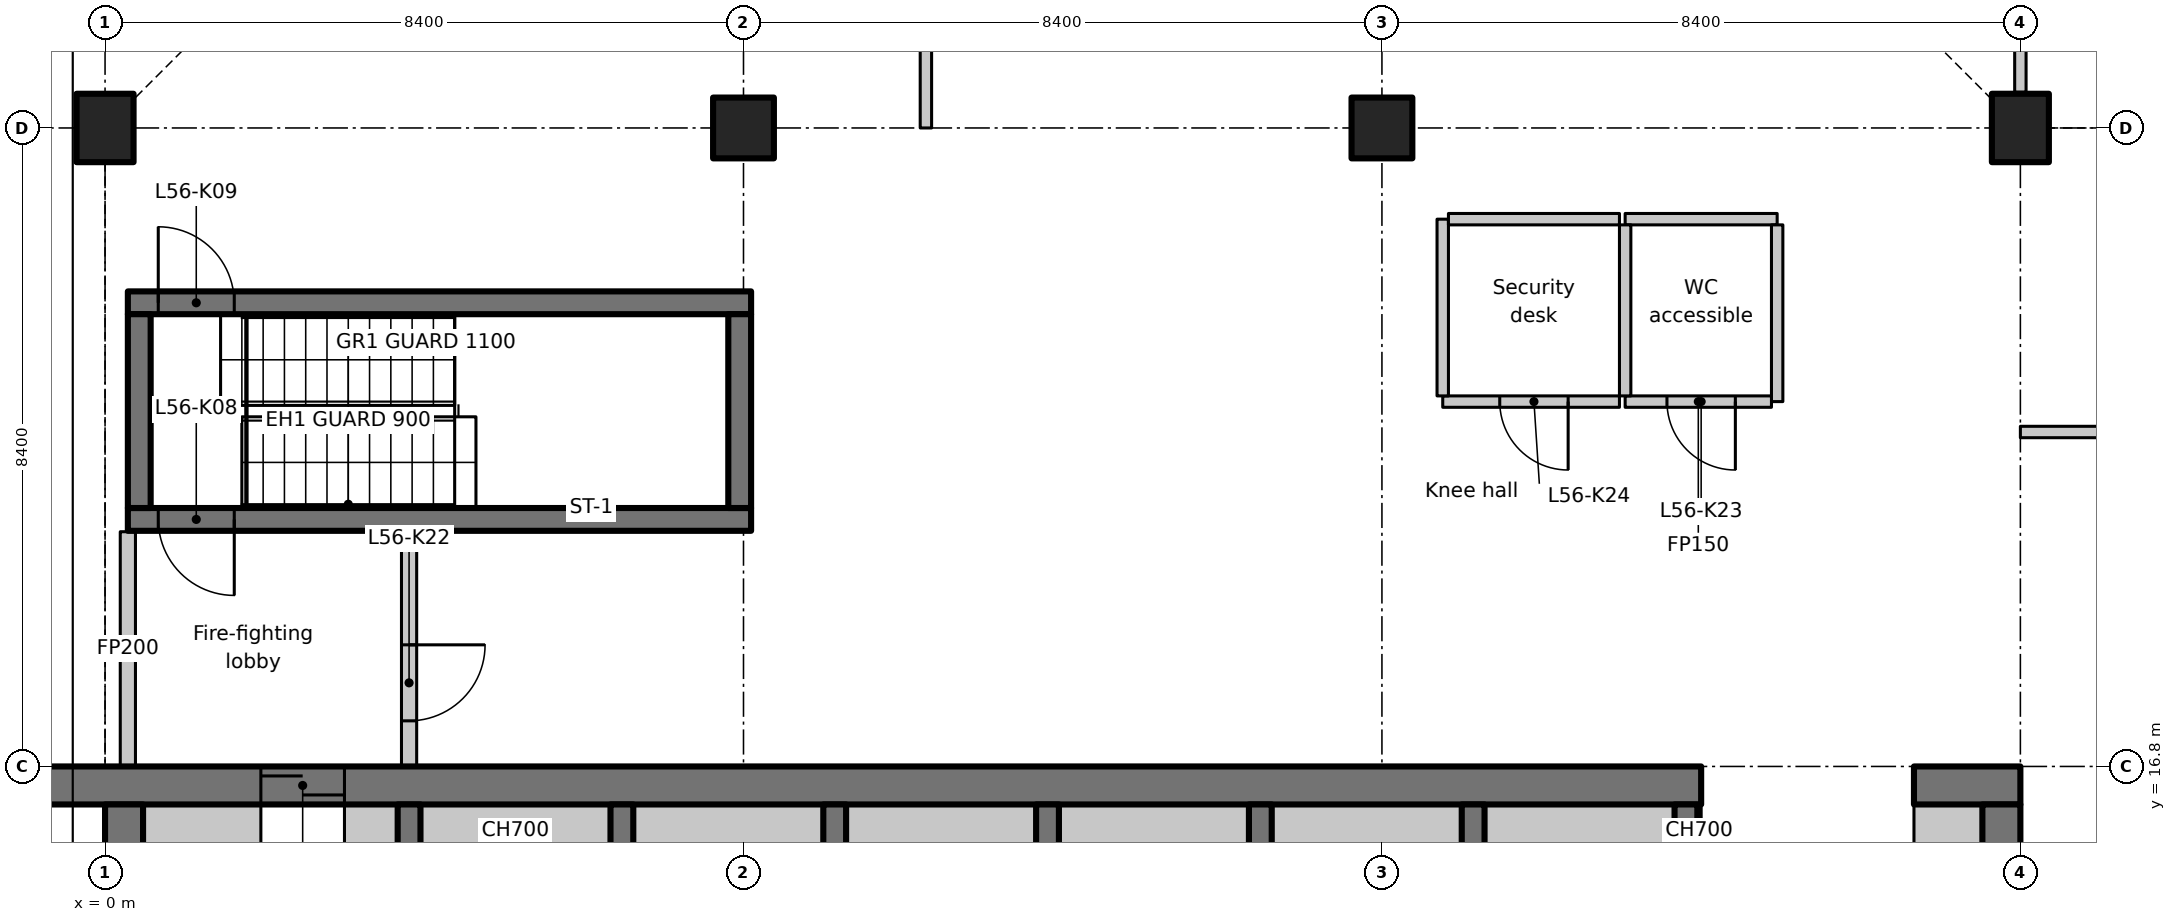
"""IFC4 building model, lengths in metres.
Left out: names, types, materials, properties, quantities, classifications, styles, units other than length and angle.
Written with IfcOpenShell. Run it as: python <this file> out.ifc"""

import sys

from ifc_helpers import new_model, si_unit, direction, frame, frame_2d, origin, origin_2d, place, context, subcontext, project, spatial, polyline, rectangle, outline, extrude, element, fill, save


model = new_model("IFC4")
c1 = context("Model", 3, precision=1e-05, world=origin(), true_north=direction((0.0, 1.0)))
c2 = subcontext(c1, "Body", "Model", "MODEL_VIEW")
j1 = project(units=[si_unit("LENGTHUNIT", "METRE"), si_unit("PLANEANGLEUNIT", "RADIAN")], contexts=[c1])
p1 = place(None, origin())
s1 = spatial("IfcSite", under=j1, at=p1, CompositionType="ELEMENT")
p2 = place(p1, origin())
s2 = spatial("IfcBuilding", under=s1, at=p2, CompositionType="ELEMENT")
p3 = place(p2, frame((0.0, 0.0, 222.9)))
s3 = spatial("IfcBuildingStorey", under=s2, at=p3, CompositionType="ELEMENT", Elevation=222.9)
p4 = place(p3, frame((0.0, 25.2, 0.0), z_axis=(0.0, 0.0, 1.0), x_axis=(1.0, 0.0, 0.0)))
e1 = element("IfcColumn", 1, at=p4, inside=s3, PredefinedType="COLUMN", context=c2, shape_type="SweptSolid", body=[
    extrude(rectangle(XDim=0.75, YDim=0.9, at=origin_2d()), origin(), (0.0, 0.0, 1.0), 3.35),
])
for number, where, z_axis, x_axis in (
    (2, (8.4, 25.2, 0.0), (0.0, 0.0, 1.0), (1.0, 0.0, 0.0)),
    (3, (16.8, 25.2, 0.0), (0.0, 0.0, 1.0), (1.0, 0.0, 0.0)),
):
    element("IfcColumn", number, at=place(p3, frame(where, z_axis=z_axis, x_axis=x_axis)), inside=s3, PredefinedType="COLUMN", context=c2, shape_type="SweptSolid", body=[
        extrude(rectangle(XDim=0.8, YDim=0.8, at=origin_2d()), origin(), (0.0, 0.0, 1.0), 3.35),
    ])
p5 = place(p3, frame((25.2, 25.2, 0.0), z_axis=(0.0, 0.0, 1.0), x_axis=(1.0, 0.0, 0.0)))
e4 = element("IfcColumn", 4, at=p5, inside=s3, PredefinedType="COLUMN", context=c2, shape_type="SweptSolid", body=[
    extrude(rectangle(XDim=0.75, YDim=0.9, at=origin_2d()), origin(), (0.0, 0.0, 1.0), 3.35),
])
p6 = place(p3, frame((-1.1, 16.55, 0.0), z_axis=(0.0, 0.0, 1.0), x_axis=(1.0, 0.0, 0.0)))
e5 = element("IfcWall", 5, at=p6, inside=s3, PredefinedType="SHEAR", context=c2, shape_type="SweptSolid", body=[
    extrude(rectangle(XDim=22.1, YDim=0.5, at=frame_2d((11.05, 0.0))), origin(), (0.0, 0.0, 1.0), 3.35),
])
p7 = place(p6, frame((3.15, 0.0, 0.0)))
e6 = element("IfcOpeningElement", 6, at=p7, cuts=e5, PredefinedType="OPENING", context=c2, shape_type="SweptSolid", body=[
    extrude(rectangle(XDim=1.1, YDim=2.3, at=frame_2d((0.55, 1.15))), frame((0.0, 0.26, 0.0), z_axis=(0.0, -1.0, 0.0), x_axis=(1.0, 0.0, 0.0)), (0.0, 0.0, 1.0), 0.52),
])
p8 = place(p3, frame((23.8, 16.55, 0.0), z_axis=(0.0, 0.0, 1.0), x_axis=(1.0, 0.0, 0.0)))
e7 = element("IfcWall", 7, at=p8, inside=s3, PredefinedType="SHEAR", context=c2, shape_type="SweptSolid", body=[
    extrude(rectangle(XDim=1.4, YDim=0.5, at=frame_2d((0.7, 0.0))), origin(), (0.0, 0.0, 1.0), 3.35),
])
p9 = place(p3, frame((0.25, 7.436, 0.0), z_axis=(0.0, 0.0, 1.0), x_axis=(0.0, 1.0, 0.0)))
e8 = element("IfcWall", 8, at=p9, inside=s3, PredefinedType="SHEAR", context=c2, shape_type="SweptSolid", body=[
    extrude(rectangle(XDim=8.864, YDim=0.5, at=frame_2d((4.432, 0.0))), origin(), (0.0, 0.0, 1.0), 3.35),
])
p10 = place(p3, frame((24.95, 12.6, 0.0), z_axis=(0.0, 0.0, 1.0), x_axis=(0.0, 1.0, 0.0)))
e9 = element("IfcWall", 9, at=p10, inside=s3, PredefinedType="SHEAR", context=c2, shape_type="SweptSolid", body=[
    extrude(rectangle(XDim=3.7, YDim=0.5, at=frame_2d((1.85, 0.0))), origin(), (0.0, 0.0, 1.0), 3.35),
])
p11 = place(p3, frame((0.5, 15.95, 0.0), z_axis=(0.0, 0.0, 1.0), x_axis=(1.0, 0.0, 0.0)))
e10 = element("IfcWall", 10, at=p11, inside=s3, PredefinedType="PARTITIONING", context=c2, shape_type="SweptSolid", body=[
    extrude(rectangle(XDim=1.55, YDim=0.7, at=frame_2d((0.775, 0.0))), origin(), (0.0, 0.0, 1.0), 3.35),
])
p12 = place(p3, frame((23.8, 15.95, 0.0), z_axis=(0.0, 0.0, 1.0), x_axis=(1.0, 0.0, 0.0)))
e11 = element("IfcWall", 11, at=p12, inside=s3, PredefinedType="PARTITIONING", context=c2, shape_type="SweptSolid", body=[
    extrude(rectangle(XDim=0.9, YDim=0.7, at=frame_2d((0.45, 0.0))), origin(), (0.0, 0.0, 1.0), 3.35),
])
for number, where, z_axis, x_axis in (
    (12, (4.0, 12.95, 0.0), (0.0, 0.0, 1.0), (0.0, 1.0, 0.0)),
    (13, (6.8, 12.95, 0.0), (0.0, 0.0, 1.0), (0.0, 1.0, 0.0)),
    (14, (9.6, 12.95, 0.0), (0.0, 0.0, 1.0), (0.0, 1.0, 0.0)),
    (15, (12.4, 12.95, 0.0), (0.0, 0.0, 1.0), (0.0, 1.0, 0.0)),
    (16, (15.2, 12.95, 0.0), (0.0, 0.0, 1.0), (0.0, 1.0, 0.0)),
    (17, (18.0, 12.95, 0.0), (0.0, 0.0, 1.0), (0.0, 1.0, 0.0)),
    (18, (20.8, 12.95, 0.0), (0.0, 0.0, 1.0), (0.0, 1.0, 0.0)),
):
    element("IfcWall", number, at=place(p3, frame(where, z_axis=z_axis, x_axis=x_axis)), inside=s3, PredefinedType="SHEAR", context=c2, shape_type="SweptSolid", body=[
        extrude(rectangle(XDim=3.35, YDim=0.3, at=frame_2d((1.675, 0.0))), origin(), (0.0, 0.0, 1.0), 3.35),
    ])
p13 = place(p3, frame((8.5, 20.05, 0.0), z_axis=(0.0, 0.0, 1.0), x_axis=(-1.0, 0.0, 0.0)))
e19 = element("IfcWall", 19, at=p13, inside=s3, PredefinedType="SHEAR", context=c2, shape_type="SweptSolid", body=[
    extrude(rectangle(XDim=8.2, YDim=0.3, at=frame_2d((4.1, 0.0))), origin(), (0.0, 0.0, 1.0), 3.35),
])
p14 = place(p13, frame((6.8, 0.0, 0.0)))
e20 = element("IfcOpeningElement", 20, at=p14, cuts=e19, PredefinedType="OPENING", context=c2, shape_type="SweptSolid", body=[
    extrude(rectangle(XDim=1.0, YDim=2.1, at=frame_2d((0.5, 1.05))), frame((0.0, 0.16, 0.0), z_axis=(0.0, -1.0, 0.0), x_axis=(1.0, 0.0, 0.0)), (0.0, 0.0, 1.0), 0.32),
])
p15 = place(p3, frame((0.3, 22.9, 0.0), z_axis=(0.0, 0.0, 1.0), x_axis=(1.0, 0.0, 0.0)))
e21 = element("IfcWall", 21, at=p15, inside=s3, PredefinedType="SHEAR", context=c2, shape_type="SweptSolid", body=[
    extrude(rectangle(XDim=8.2, YDim=0.3, at=frame_2d((4.1, 0.0))), origin(), (0.0, 0.0, 1.0), 3.35),
])
p16 = place(p15, frame((0.4, 0.0, 0.0)))
e22 = element("IfcOpeningElement", 22, at=p16, cuts=e21, PredefinedType="OPENING", context=c2, shape_type="SweptSolid", body=[
    extrude(rectangle(XDim=1.0, YDim=2.1, at=frame_2d((0.5, 1.05))), frame((0.0, 0.16, 0.0), z_axis=(0.0, -1.0, 0.0), x_axis=(1.0, 0.0, 0.0)), (0.0, 0.0, 1.0), 0.32),
])
for number, where, z_axis, x_axis in (
    (23, (0.45, 20.2, 0.0), (0.0, 0.0, 1.0), (0.0, 1.0, 0.0)),
    (24, (8.35, 20.2, 0.0), (0.0, 0.0, 1.0), (0.0, 1.0, 0.0)),
):
    element("IfcWall", number, at=place(p3, frame(where, z_axis=z_axis, x_axis=x_axis)), inside=s3, PredefinedType="SHEAR", context=c2, shape_type="SweptSolid", body=[
        extrude(rectangle(XDim=2.55, YDim=0.3, at=frame_2d((1.275, 0.0))), origin(), (0.0, 0.0, 1.0), 3.35),
    ])
p17 = place(p3, frame((0.3, 16.812, 0.0), z_axis=(0.0, 0.0, 1.0), x_axis=(0.0, 1.0, 0.0)))
e25 = element("IfcWall", 25, at=p17, inside=s3, PredefinedType="PARTITIONING", context=c2, shape_type="SweptSolid", body=[
    extrude(rectangle(XDim=3.076, YDim=0.2, at=frame_2d((1.538, 0.0))), origin(), (0.0, 0.0, 1.0), 2.98),
])
p18 = place(p3, frame((4.0, 19.888, 0.0), z_axis=(0.0, 0.0, 1.0), x_axis=(0.0, -1.0, 0.0)))
e26 = element("IfcWall", 26, at=p18, inside=s3, PredefinedType="PARTITIONING", context=c2, shape_type="SweptSolid", body=[
    extrude(rectangle(XDim=3.076, YDim=0.2, at=frame_2d((1.538, 0.0))), origin(), (0.0, 0.0, 1.0), 3.35),
])
p19 = place(p18, frame((1.488, 0.0, 0.0)))
e27 = element("IfcOpeningElement", 27, at=p19, cuts=e26, PredefinedType="OPENING", context=c2, shape_type="SweptSolid", body=[
    extrude(rectangle(XDim=1.0, YDim=2.1, at=frame_2d((0.5, 1.05))), frame((0.0, 0.11, 0.0), z_axis=(0.0, -1.0, 0.0), x_axis=(1.0, 0.0, 0.0)), (0.0, 0.0, 1.0), 0.22),
])
p20 = place(p3, frame((20.0, 24.0, 0.0), z_axis=(0.0, 0.0, 1.0), x_axis=(1.0, 0.0, 0.0)))
e28 = element("IfcWall", 28, at=p20, inside=s3, PredefinedType="PARTITIONING", context=c2, shape_type="SweptSolid", body=[
    extrude(rectangle(XDim=2.0, YDim=0.15, at=frame_2d((1.0, 0.0))), origin(), (0.0, 0.0, 1.0), 3.35),
])
p21 = place(p3, frame((22.0, 23.925, 0.0), z_axis=(0.0, 0.0, 1.0), x_axis=(0.0, -1.0, 0.0)))
e29 = element("IfcWall", 29, at=p21, inside=s3, PredefinedType="PARTITIONING", context=c2, shape_type="SweptSolid", body=[
    extrude(rectangle(XDim=2.325, YDim=0.15, at=frame_2d((1.163, 0.0))), origin(), (0.0, 0.0, 1.0), 3.35),
])
p22 = place(p3, frame((21.925, 21.6, 0.0), z_axis=(0.0, 0.0, 1.0), x_axis=(-1.0, 0.0, 0.0)))
e30 = element("IfcWall", 30, at=p22, inside=s3, PredefinedType="PARTITIONING", context=c2, shape_type="SweptSolid", body=[
    extrude(rectangle(XDim=1.925, YDim=0.15, at=frame_2d((0.962, 0.0))), origin(), (0.0, 0.0, 1.0), 3.35),
])
p23 = place(p22, frame((0.475, 0.0, 0.0)))
e31 = element("IfcOpeningElement", 31, at=p23, cuts=e30, PredefinedType="OPENING", context=c2, shape_type="SweptSolid", body=[
    extrude(rectangle(XDim=0.9, YDim=2.1, at=frame_2d((0.45, 1.05))), frame((0.0, 0.085, 0.0), z_axis=(0.0, -1.0, 0.0), x_axis=(1.0, 0.0, 0.0)), (0.0, 0.0, 1.0), 0.17),
])
p24 = place(p3, frame((20.0, 21.675, 0.0), z_axis=(0.0, 0.0, 1.0), x_axis=(0.0, 1.0, 0.0)))
e32 = element("IfcWall", 32, at=p24, inside=s3, PredefinedType="PARTITIONING", context=c2, shape_type="SweptSolid", body=[
    extrude(rectangle(XDim=2.25, YDim=0.15, at=frame_2d((1.125, 0.0))), origin(), (0.0, 0.0, 1.0), 3.35),
])
p25 = place(p3, frame((19.925, 21.6, 0.0), z_axis=(0.0, 0.0, 1.0), x_axis=(-1.0, 0.0, 0.0)))
e33 = element("IfcWall", 33, at=p25, inside=s3, PredefinedType="PARTITIONING", context=c2, shape_type="SweptSolid", body=[
    extrude(rectangle(XDim=2.325, YDim=0.15, at=frame_2d((1.163, 0.0))), origin(), (0.0, 0.0, 1.0), 3.35),
])
p26 = place(p25, frame((0.675, 0.0, 0.0)))
e34 = element("IfcOpeningElement", 34, at=p26, cuts=e33, PredefinedType="OPENING", context=c2, shape_type="SweptSolid", body=[
    extrude(rectangle(XDim=0.9, YDim=2.1, at=frame_2d((0.45, 1.05))), frame((0.0, 0.085, 0.0), z_axis=(0.0, -1.0, 0.0), x_axis=(1.0, 0.0, 0.0)), (0.0, 0.0, 1.0), 0.17),
])
p27 = place(p3, frame((17.6, 21.675, 0.0), z_axis=(0.0, 0.0, 1.0), x_axis=(0.0, 1.0, 0.0)))
e35 = element("IfcWall", 35, at=p27, inside=s3, PredefinedType="PARTITIONING", context=c2, shape_type="SweptSolid", body=[
    extrude(rectangle(XDim=2.325, YDim=0.15, at=frame_2d((1.163, 0.0))), origin(), (0.0, 0.0, 1.0), 3.35),
])
p28 = place(p3, frame((17.675, 24.0, 0.0), z_axis=(0.0, 0.0, 1.0), x_axis=(1.0, 0.0, 0.0)))
e36 = element("IfcWall", 36, at=p28, inside=s3, PredefinedType="PARTITIONING", context=c2, shape_type="SweptSolid", body=[
    extrude(rectangle(XDim=2.25, YDim=0.15, at=frame_2d((1.125, 0.0))), origin(), (0.0, 0.0, 1.0), 3.35),
])
p29 = place(p3, frame((3.15, 15.95, 0.0), z_axis=(0.0, 0.0, 1.0), x_axis=(1.0, 0.0, 0.0)))
e37 = element("IfcWall", 37, at=p29, inside=s3, PredefinedType="PARTITIONING", context=c2, shape_type="SweptSolid", body=[
    extrude(rectangle(XDim=0.7, YDim=0.7, at=frame_2d((0.35, 0.0))), origin(), (0.0, 0.0, 1.0), 3.35),
])
for number, where, z_axis, x_axis in (
    (38, (4.15, 15.95, 0.0), (0.0, 0.0, 1.0), (1.0, 0.0, 0.0)),
    (39, (6.95, 15.95, 0.0), (0.0, 0.0, 1.0), (1.0, 0.0, 0.0)),
    (40, (9.75, 15.95, 0.0), (0.0, 0.0, 1.0), (1.0, 0.0, 0.0)),
    (41, (12.55, 15.95, 0.0), (0.0, 0.0, 1.0), (1.0, 0.0, 0.0)),
    (42, (15.35, 15.95, 0.0), (0.0, 0.0, 1.0), (1.0, 0.0, 0.0)),
    (43, (18.15, 15.95, 0.0), (0.0, 0.0, 1.0), (1.0, 0.0, 0.0)),
):
    element("IfcWall", number, at=place(p3, frame(where, z_axis=z_axis, x_axis=x_axis)), inside=s3, PredefinedType="PARTITIONING", context=c2, shape_type="SweptSolid", body=[
        extrude(rectangle(XDim=2.5, YDim=0.7, at=frame_2d((1.25, 0.0))), origin(), (0.0, 0.0, 1.0), 3.35),
    ])
p30 = place(p3, frame((20.95, 15.95, 0.0), z_axis=(0.0, 0.0, 1.0), x_axis=(1.0, 0.0, 0.0)))
e44 = element("IfcWall", 44, at=p30, inside=s3, PredefinedType="PARTITIONING", context=c2, shape_type="SweptSolid", body=[
    extrude(rectangle(XDim=0.05, YDim=0.7, at=frame_2d((0.025, 0.0))), origin(), (0.0, 0.0, 1.0), 3.35),
])
p31 = place(p3, frame((25.2, 21.2, 0.0), z_axis=(0.0, 0.0, 1.0), x_axis=(1.0, 0.0, 0.0)))
e45 = element("IfcWall", 45, at=p31, inside=s3, PredefinedType="PARTITIONING", context=c2, shape_type="SweptSolid", body=[
    extrude(rectangle(XDim=4.2, YDim=0.15, at=frame_2d((2.1, 0.0))), origin(), (0.0, 0.0, 1.0), 3.33),
])
p32 = place(p31, frame((1.5, 0.0, 0.0)))
e46 = element("IfcOpeningElement", 46, at=p32, cuts=e45, PredefinedType="OPENING", context=c2, shape_type="SweptSolid", body=[
    extrude(rectangle(XDim=1.0, YDim=2.1, at=frame_2d((0.5, 1.05))), frame((0.0, 0.085, 0.0), z_axis=(0.0, -1.0, 0.0), x_axis=(1.0, 0.0, 0.0)), (0.0, 0.0, 1.0), 0.17),
])
p33 = place(p3, frame((25.2, 25.67, 0.0), z_axis=(0.0, 0.0, 1.0), x_axis=(0.0, 1.0, 0.0)))
e47 = element("IfcWall", 47, at=p33, inside=s3, PredefinedType="PARTITIONING", context=c2, shape_type="SweptSolid", body=[
    extrude(rectangle(XDim=3.93, YDim=0.15, at=frame_2d((1.965, 0.0))), origin(), (0.0, 0.0, 1.0), 2.98),
])
p34 = place(p3, frame((10.8, 25.2, 0.0), z_axis=(0.0, 0.0, 1.0), x_axis=(0.0, 1.0, 0.0)))
e48 = element("IfcWall", 48, at=p34, inside=s3, PredefinedType="PARTITIONING", context=c2, shape_type="SweptSolid", body=[
    extrude(outline(polyline([(0.0, 0.0), (8.4, 0.0), (8.4, 2.98), (7.952, 2.98), (7.95, 3.33), (0.0, 3.33), (0.0, 0.0)])), frame((0.0, 0.075, 0.0), z_axis=(0.0, -1.0, 0.0), x_axis=(1.0, 0.0, 0.0)), (0.0, 0.0, 1.0), 0.15),
])
p35 = place(p34, frame((3.3, 0.0, 0.0)))
e49 = element("IfcOpeningElement", 49, at=p35, cuts=e48, PredefinedType="OPENING", context=c2, shape_type="SweptSolid", body=[
    extrude(rectangle(XDim=1.6, YDim=2.1, at=frame_2d((0.8, 1.05))), frame((0.0, 0.085, 0.0), z_axis=(0.0, -1.0, 0.0), x_axis=(1.0, 0.0, 0.0)), (0.0, 0.0, 1.0), 0.17),
])
p36 = place(p7, origin())
e50 = element("IfcDoor", 50, at=p36, inside=s3, OperationType="SLIDING_TO_LEFT", PredefinedType="DOOR", context=c2, shape_type="SweptSolid", body=[
    extrude(rectangle(XDim=1.1, YDim=2.3, at=frame_2d((0.55, 1.15))), frame((0.0, 0.025, 0.0), z_axis=(0.0, -1.0, 0.0), x_axis=(1.0, 0.0, 0.0)), (0.0, 0.0, 1.0), 0.05),
])
fill(e6, e50)
p37 = place(p14, origin())
e51 = element("IfcDoor", 51, at=p37, inside=s3, OperationType="SINGLE_SWING_LEFT", PredefinedType="DOOR", context=c2, shape_type="SweptSolid", body=[
    extrude(rectangle(XDim=1.0, YDim=2.1, at=frame_2d((0.5, 1.05))), frame((0.0, 0.025, 0.0), z_axis=(0.0, -1.0, 0.0), x_axis=(1.0, 0.0, 0.0)), (0.0, 0.0, 1.0), 0.05),
])
fill(e20, e51)
p38 = place(p16, origin())
e52 = element("IfcDoor", 52, at=p38, inside=s3, OperationType="SINGLE_SWING_RIGHT", PredefinedType="DOOR", context=c2, shape_type="SweptSolid", body=[
    extrude(rectangle(XDim=1.0, YDim=2.1, at=frame_2d((0.5, 1.05))), frame((0.0, 0.025, 0.0), z_axis=(0.0, -1.0, 0.0), x_axis=(1.0, 0.0, 0.0)), (0.0, 0.0, 1.0), 0.05),
])
fill(e22, e52)
p39 = place(p19, origin())
e53 = element("IfcDoor", 53, at=p39, inside=s3, OperationType="SINGLE_SWING_LEFT", PredefinedType="DOOR", context=c2, shape_type="SweptSolid", body=[
    extrude(rectangle(XDim=1.0, YDim=2.1, at=frame_2d((0.5, 1.05))), frame((0.0, 0.025, 0.0), z_axis=(0.0, -1.0, 0.0), x_axis=(1.0, 0.0, 0.0)), (0.0, 0.0, 1.0), 0.05),
])
fill(e27, e53)
p40 = place(p23, origin())
e54 = element("IfcDoor", 54, at=p40, inside=s3, OperationType="SINGLE_SWING_RIGHT", PredefinedType="DOOR", context=c2, shape_type="SweptSolid", body=[
    extrude(rectangle(XDim=0.9, YDim=2.1, at=frame_2d((0.45, 1.05))), frame((0.0, 0.025, 0.0), z_axis=(0.0, -1.0, 0.0), x_axis=(1.0, 0.0, 0.0)), (0.0, 0.0, 1.0), 0.05),
])
fill(e31, e54)
p41 = place(p26, origin())
e55 = element("IfcDoor", 55, at=p41, inside=s3, OperationType="SINGLE_SWING_LEFT", PredefinedType="DOOR", context=c2, shape_type="SweptSolid", body=[
    extrude(rectangle(XDim=0.9, YDim=2.1, at=frame_2d((0.45, 1.05))), frame((0.0, 0.025, 0.0), z_axis=(0.0, -1.0, 0.0), x_axis=(1.0, 0.0, 0.0)), (0.0, 0.0, 1.0), 0.05),
])
fill(e34, e55)
save(model, sys.argv[1])
